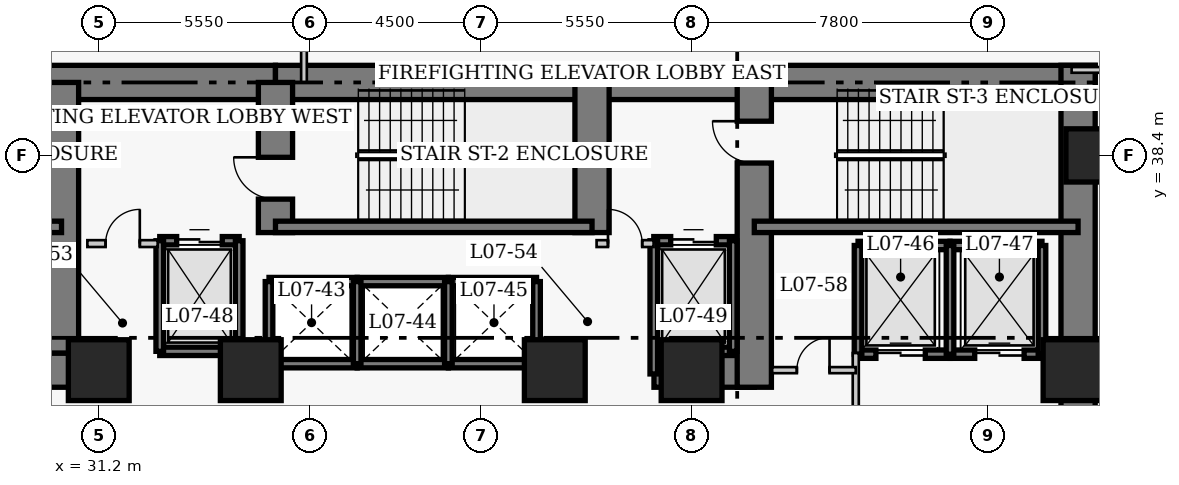
"""IFC4 building model, lengths in metres.
Left out: names, types, materials, properties, quantities, classifications, styles, units other than length and angle.
Written with IfcOpenShell. Run it as: python <this file> out.ifc"""

import sys

from ifc_helpers import new_model, si_unit, direction, frame, frame_2d, origin, origin_2d, place, context, subcontext, project, spatial, rectangle, extrude, element, fill, save


model = new_model("IFC4")
c1 = context("Model", 3, precision=1e-05, world=origin(), true_north=direction((0.0, 1.0)))
c2 = subcontext(c1, "Body", "Model", "MODEL_VIEW")
j1 = project(units=[si_unit("LENGTHUNIT", "METRE"), si_unit("PLANEANGLEUNIT", "RADIAN")], contexts=[c1])
p1 = place(None, origin())
s1 = spatial("IfcSite", under=j1, at=p1, CompositionType="ELEMENT")
p2 = place(p1, origin())
s2 = spatial("IfcBuilding", under=s1, at=p2, CompositionType="ELEMENT")
p3 = place(p2, frame((0.0, 0.0, 33.6)))
s3 = spatial("IfcBuildingStorey", under=s2, at=p3, CompositionType="ELEMENT", Elevation=33.6)
p4 = place(p3, frame((21.45, 40.32, 0.0), z_axis=(0.0, 0.0, 1.0), x_axis=(1.0, 0.0, 0.0)))
e1 = element("IfcWall", 1, at=p4, inside=s3, PredefinedType="SHEAR", context=c2, shape_type="SweptSolid", body=[
    extrude(rectangle(XDim=14.4, YDim=0.9, at=frame_2d((7.2, 0.0))), origin(), (0.0, 0.0, 1.0), 3.8),
])
p5 = place(p3, frame((35.85, 40.32, 0.0), z_axis=(0.0, 0.0, 1.0), x_axis=(1.0, 0.0, 0.0)))
e2 = element("IfcWall", 2, at=p5, inside=s3, PredefinedType="SHEAR", context=c2, shape_type="SweptSolid", body=[
    extrude(rectangle(XDim=12.6, YDim=0.9, at=frame_2d((6.3, 0.0))), origin(), (0.0, 0.0, 1.0), 3.8),
])
p6 = place(p3, frame((48.45, 40.32, 0.0), z_axis=(0.0, 0.0, 1.0), x_axis=(1.0, 0.0, 0.0)))
e3 = element("IfcWall", 3, at=p6, inside=s3, PredefinedType="SHEAR", context=c2, shape_type="SweptSolid", body=[
    extrude(rectangle(XDim=8.97, YDim=0.9, at=frame_2d((4.485, 0.0))), origin(), (0.0, 0.0, 1.0), 3.8),
])
p7 = place(p3, frame((56.97, 27.05, 0.0), z_axis=(0.0, 0.0, 1.0), x_axis=(0.0, 1.0, 0.0)))
e4 = element("IfcWall", 4, at=p7, inside=s3, PredefinedType="SHEAR", context=c2, shape_type="SweptSolid", body=[
    extrude(rectangle(XDim=13.72, YDim=0.9, at=frame_2d((6.86, 0.0))), origin(), (0.0, 0.0, 1.0), 3.8),
])
p8 = place(p3, frame((28.45, 32.75, 0.0), z_axis=(0.0, 0.0, 1.0), x_axis=(1.0, 0.0, 0.0)))
e5 = element("IfcWall", 5, at=p8, inside=s3, PredefinedType="SHEAR", context=c2, shape_type="SweptSolid", body=[
    extrude(rectangle(XDim=2.4, YDim=0.9, at=frame_2d((1.2, 0.0))), origin(), (0.0, 0.0, 1.0), 3.8),
])
p9 = place(p3, frame((45.81, 32.75, 0.0), z_axis=(0.0, 0.0, 1.0), x_axis=(1.0, 0.0, 0.0)))
e6 = element("IfcWall", 6, at=p9, inside=s3, PredefinedType="SHEAR", context=c2, shape_type="SweptSolid", body=[
    extrude(rectangle(XDim=2.64, YDim=0.9, at=frame_2d((1.32, 0.0))), origin(), (0.0, 0.0, 1.0), 3.8),
])
p10 = place(p3, frame((30.22, 33.2, 0.0), z_axis=(0.0, 0.0, 1.0), x_axis=(0.0, 1.0, 0.0)))
e7 = element("IfcWall", 7, at=p10, inside=s3, PredefinedType="SHEAR", context=c2, shape_type="SweptSolid", body=[
    extrude(rectangle(XDim=7.12, YDim=0.9, at=frame_2d((3.56, 0.0))), origin(), (0.0, 0.0, 1.0), 3.8),
])
p11 = place(p3, frame((35.85, 36.37, 0.0), z_axis=(0.0, 0.0, 1.0), x_axis=(0.0, 1.0, 0.0)))
e8 = element("IfcWall", 8, at=p11, inside=s3, PredefinedType="SHEAR", context=c2, shape_type="SweptSolid", body=[
    extrude(rectangle(XDim=3.95, YDim=0.9, at=frame_2d((1.975, 0.0))), origin(), (0.0, 0.0, 1.0), 3.8),
])
p12 = place(p11, frame((0.88, 0.0, 0.0)))
e9 = element("IfcOpeningElement", 9, at=p12, cuts=e8, PredefinedType="OPENING", context=c2, shape_type="SweptSolid", body=[
    extrude(rectangle(XDim=1.1, YDim=2.15, at=frame_2d((0.55, 1.075))), frame((0.0, 0.46, 0.0), z_axis=(0.0, -1.0, 0.0), x_axis=(1.0, 0.0, 0.0)), (0.0, 0.0, 1.0), 0.92),
])
p13 = place(p3, frame((44.18, 36.37, 0.0), z_axis=(0.0, 0.0, 1.0), x_axis=(0.0, 1.0, 0.0)))
e10 = element("IfcWall", 10, at=p13, inside=s3, PredefinedType="SHEAR", context=c2, shape_type="SweptSolid", body=[
    extrude(rectangle(XDim=3.95, YDim=0.9, at=frame_2d((1.975, 0.0))), origin(), (0.0, 0.0, 1.0), 3.8),
])
p14 = place(p3, frame((48.45, 32.3, 0.0), z_axis=(0.0, 0.0, 1.0), x_axis=(0.0, 1.0, 0.0)))
e11 = element("IfcWall", 11, at=p14, inside=s3, PredefinedType="SHEAR", context=c2, shape_type="SweptSolid", body=[
    extrude(rectangle(XDim=8.02, YDim=0.9, at=frame_2d((4.01, 0.0))), origin(), (0.0, 0.0, 1.0), 3.8),
])
p15 = place(p14, frame((5.9, 0.0, 0.0)))
e12 = element("IfcOpeningElement", 12, at=p15, cuts=e11, PredefinedType="OPENING", context=c2, shape_type="SweptSolid", body=[
    extrude(rectangle(XDim=1.1, YDim=2.15, at=frame_2d((0.55, 1.075))), frame((0.0, 0.46, 0.0), z_axis=(0.0, -1.0, 0.0), x_axis=(1.0, 0.0, 0.0)), (0.0, 0.0, 1.0), 0.92),
])
p16 = place(p3, frame((21.9, 36.52, 0.0), z_axis=(0.0, 0.0, 1.0), x_axis=(1.0, 0.0, 0.0)))
e13 = element("IfcWall", 13, at=p16, inside=s3, PredefinedType="SHEAR", context=c2, shape_type="SweptSolid", body=[
    extrude(rectangle(XDim=8.32, YDim=0.3, at=frame_2d((4.16, 0.0))), origin(), (0.0, 0.0, 1.0), 3.8),
])
p17 = place(p16, frame((0.9, 0.0, 0.0)))
e14 = element("IfcOpeningElement", 14, at=p17, cuts=e13, PredefinedType="OPENING", context=c2, shape_type="SweptSolid", body=[
    extrude(rectangle(XDim=1.1, YDim=2.15, at=frame_2d((0.55, 1.075))), frame((0.0, 0.16, 0.0), z_axis=(0.0, -1.0, 0.0), x_axis=(1.0, 0.0, 0.0)), (0.0, 0.0, 1.0), 0.32),
])
p18 = place(p3, frame((35.85, 36.52, 0.0), z_axis=(0.0, 0.0, 1.0), x_axis=(1.0, 0.0, 0.0)))
e15 = element("IfcWall", 15, at=p18, inside=s3, PredefinedType="SHEAR", context=c2, shape_type="SweptSolid", body=[
    extrude(rectangle(XDim=8.33, YDim=0.3, at=frame_2d((4.165, 0.0))), origin(), (0.0, 0.0, 1.0), 3.8),
])
p19 = place(p3, frame((48.45, 36.52, 0.0), z_axis=(0.0, 0.0, 1.0), x_axis=(1.0, 0.0, 0.0)))
e16 = element("IfcWall", 16, at=p19, inside=s3, PredefinedType="SHEAR", context=c2, shape_type="SweptSolid", body=[
    extrude(rectangle(XDim=8.52, YDim=0.3, at=frame_2d((4.26, 0.0))), origin(), (0.0, 0.0, 1.0), 3.8),
])
p20 = place(p3, frame((57.35, 38.4, 0.0), z_axis=(0.0, 0.0, 1.0), x_axis=(1.0, 0.0, 0.0)))
e17 = element("IfcColumn", 17, at=p20, inside=s3, PredefinedType="COLUMN", context=c2, shape_type="SweptSolid", body=[
    extrude(rectangle(XDim=1.4, YDim=1.4, at=origin_2d()), origin(), (0.0, 0.0, 1.0), 3.8),
])
for number, where, z_axis, x_axis in (
    (18, (31.2, 32.75, 0.0), (0.0, 0.0, 1.0), (1.0, 0.0, 0.0)),
    (19, (35.2, 32.75, 0.0), (0.0, 0.0, 1.0), (1.0, 0.0, 0.0)),
    (20, (43.2, 32.75, 0.0), (0.0, 0.0, 1.0), (1.0, 0.0, 0.0)),
    (21, (46.8, 32.75, 0.0), (0.0, 0.0, 1.0), (1.0, 0.0, 0.0)),
    (22, (56.85, 32.75, 0.0), (0.0, 0.0, 1.0), (1.0, 0.0, 0.0)),
):
    element("IfcColumn", number, at=place(p3, frame(where, z_axis=z_axis, x_axis=x_axis)), inside=s3, PredefinedType="COLUMN", context=c2, shape_type="SweptSolid", body=[
        extrude(rectangle(XDim=1.6, YDim=1.6, at=origin_2d()), origin(), (0.0, 0.0, 1.0), 3.8),
    ])
for number, where, z_axis, x_axis in (
    (23, (35.68, 35.08, 0.0), (0.0, 0.0, 1.0), (1.0, 0.0, 0.0)),
    (24, (35.68, 32.92, 0.0), (0.0, 0.0, 1.0), (1.0, 0.0, 0.0)),
):
    element("IfcWall", number, at=place(p3, frame(where, z_axis=z_axis, x_axis=x_axis)), inside=s3, PredefinedType="SHEAR", context=c2, shape_type="SweptSolid", body=[
        extrude(rectangle(XDim=2.32, YDim=0.22, at=frame_2d((1.16, 0.0))), origin(), (0.0, 0.0, 1.0), 3.8),
    ])
p21 = place(p3, frame((35.68, 32.92, 0.0), z_axis=(0.0, 0.0, 1.0), x_axis=(0.0, 1.0, 0.0)))
e25 = element("IfcWall", 25, at=p21, inside=s3, PredefinedType="SHEAR", context=c2, shape_type="SweptSolid", body=[
    extrude(rectangle(XDim=2.16, YDim=0.2, at=frame_2d((1.08, 0.0))), origin(), (0.0, 0.0, 1.0), 3.8),
])
for number, where, z_axis, x_axis in (
    (26, (38.0, 35.08, 0.0), (0.0, 0.0, 1.0), (1.0, 0.0, 0.0)),
    (27, (38.0, 32.92, 0.0), (0.0, 0.0, 1.0), (1.0, 0.0, 0.0)),
):
    element("IfcWall", number, at=place(p3, frame(where, z_axis=z_axis, x_axis=x_axis)), inside=s3, PredefinedType="SHEAR", context=c2, shape_type="SweptSolid", body=[
        extrude(rectangle(XDim=2.4, YDim=0.22, at=frame_2d((1.2, 0.0))), origin(), (0.0, 0.0, 1.0), 3.8),
    ])
p22 = place(p3, frame((38.0, 32.92, 0.0), z_axis=(0.0, 0.0, 1.0), x_axis=(0.0, 1.0, 0.0)))
e28 = element("IfcWall", 28, at=p22, inside=s3, PredefinedType="SHEAR", context=c2, shape_type="SweptSolid", body=[
    extrude(rectangle(XDim=2.16, YDim=0.2, at=frame_2d((1.08, 0.0))), origin(), (0.0, 0.0, 1.0), 3.8),
])
for number, where, z_axis, x_axis in (
    (29, (40.4, 35.08, 0.0), (0.0, 0.0, 1.0), (1.0, 0.0, 0.0)),
    (30, (40.4, 32.92, 0.0), (0.0, 0.0, 1.0), (1.0, 0.0, 0.0)),
):
    element("IfcWall", number, at=place(p3, frame(where, z_axis=z_axis, x_axis=x_axis)), inside=s3, PredefinedType="SHEAR", context=c2, shape_type="SweptSolid", body=[
        extrude(rectangle(XDim=2.32, YDim=0.22, at=frame_2d((1.16, 0.0))), origin(), (0.0, 0.0, 1.0), 3.8),
    ])
for number, where, z_axis, x_axis in (
    (31, (40.4, 32.92, 0.0), (0.0, 0.0, 1.0), (0.0, 1.0, 0.0)),
    (32, (42.72, 32.92, 0.0), (0.0, 0.0, 1.0), (0.0, 1.0, 0.0)),
):
    element("IfcWall", number, at=place(p3, frame(where, z_axis=z_axis, x_axis=x_axis)), inside=s3, PredefinedType="SHEAR", context=c2, shape_type="SweptSolid", body=[
        extrude(rectangle(XDim=2.16, YDim=0.2, at=frame_2d((1.08, 0.0))), origin(), (0.0, 0.0, 1.0), 3.8),
    ])
p23 = place(p3, frame((51.18, 36.03, 0.0), z_axis=(0.0, 0.0, 1.0), x_axis=(1.0, 0.0, 0.0)))
e33 = element("IfcWall", 33, at=p23, inside=s3, PredefinedType="SHEAR", context=c2, shape_type="SweptSolid", body=[
    extrude(rectangle(XDim=2.42, YDim=0.22, at=frame_2d((1.21, 0.0))), origin(), (0.0, 0.0, 1.0), 3.8),
])
p24 = place(p3, frame((51.18, 33.17, 0.0), z_axis=(0.0, 0.0, 1.0), x_axis=(1.0, 0.0, 0.0)))
e34 = element("IfcWall", 34, at=p24, inside=s3, PredefinedType="SHEAR", context=c2, shape_type="SweptSolid", body=[
    extrude(rectangle(XDim=2.42, YDim=0.22, at=frame_2d((1.21, 0.0))), origin(), (0.0, 0.0, 1.0), 3.8),
])
p25 = place(p24, frame((0.47, 0.0, 0.0)))
e35 = element("IfcOpeningElement", 35, at=p25, cuts=e34, PredefinedType="OPENING", context=c2, shape_type="SweptSolid", body=[
    extrude(rectangle(XDim=1.3, YDim=2.15, at=frame_2d((0.65, 1.075))), frame((0.0, 0.12, 0.0), z_axis=(0.0, -1.0, 0.0), x_axis=(1.0, 0.0, 0.0)), (0.0, 0.0, 1.0), 0.24),
])
p26 = place(p3, frame((51.18, 33.17, 0.0), z_axis=(0.0, 0.0, 1.0), x_axis=(0.0, 1.0, 0.0)))
e36 = element("IfcWall", 36, at=p26, inside=s3, PredefinedType="SHEAR", context=c2, shape_type="SweptSolid", body=[
    extrude(rectangle(XDim=2.86, YDim=0.2, at=frame_2d((1.43, 0.0))), origin(), (0.0, 0.0, 1.0), 3.8),
])
p27 = place(p3, frame((53.6, 36.03, 0.0), z_axis=(0.0, 0.0, 1.0), x_axis=(1.0, 0.0, 0.0)))
e37 = element("IfcWall", 37, at=p27, inside=s3, PredefinedType="SHEAR", context=c2, shape_type="SweptSolid", body=[
    extrude(rectangle(XDim=2.42, YDim=0.22, at=frame_2d((1.21, 0.0))), origin(), (0.0, 0.0, 1.0), 3.8),
])
p28 = place(p3, frame((53.6, 33.17, 0.0), z_axis=(0.0, 0.0, 1.0), x_axis=(1.0, 0.0, 0.0)))
e38 = element("IfcWall", 38, at=p28, inside=s3, PredefinedType="SHEAR", context=c2, shape_type="SweptSolid", body=[
    extrude(rectangle(XDim=2.42, YDim=0.22, at=frame_2d((1.21, 0.0))), origin(), (0.0, 0.0, 1.0), 3.8),
])
p29 = place(p28, frame((0.65, 0.0, 0.0)))
e39 = element("IfcOpeningElement", 39, at=p29, cuts=e38, PredefinedType="OPENING", context=c2, shape_type="SweptSolid", body=[
    extrude(rectangle(XDim=1.3, YDim=2.15, at=frame_2d((0.65, 1.075))), frame((0.0, 0.12, 0.0), z_axis=(0.0, -1.0, 0.0), x_axis=(1.0, 0.0, 0.0)), (0.0, 0.0, 1.0), 0.24),
])
for number, where, z_axis, x_axis in (
    (40, (53.6, 33.17, 0.0), (0.0, 0.0, 1.0), (0.0, 1.0, 0.0)),
    (41, (56.02, 33.17, 0.0), (0.0, 0.0, 1.0), (0.0, 1.0, 0.0)),
):
    element("IfcWall", number, at=place(p3, frame(where, z_axis=z_axis, x_axis=x_axis)), inside=s3, PredefinedType="SHEAR", context=c2, shape_type="SweptSolid", body=[
        extrude(rectangle(XDim=2.86, YDim=0.2, at=frame_2d((1.43, 0.0))), origin(), (0.0, 0.0, 1.0), 3.8),
    ])
p30 = place(p3, frame((32.805, 36.155, 0.0), z_axis=(0.0, 0.0, 1.0), x_axis=(1.0, 0.0, 0.0)))
e42 = element("IfcWall", 42, at=p30, inside=s3, PredefinedType="SHEAR", context=c2, shape_type="SweptSolid", body=[
    extrude(rectangle(XDim=2.09, YDim=0.22, at=frame_2d((1.045, 0.0))), origin(), (0.0, 0.0, 1.0), 3.8),
])
p31 = place(p30, frame((0.445, 0.0, 0.0)))
e43 = element("IfcOpeningElement", 43, at=p31, cuts=e42, PredefinedType="OPENING", context=c2, shape_type="SweptSolid", body=[
    extrude(rectangle(XDim=1.2, YDim=2.15, at=frame_2d((0.6, 1.075))), frame((0.0, 0.12, 0.0), z_axis=(0.0, -1.0, 0.0), x_axis=(1.0, 0.0, 0.0)), (0.0, 0.0, 1.0), 0.24),
])
p32 = place(p3, frame((32.805, 33.245, 0.0), z_axis=(0.0, 0.0, 1.0), x_axis=(1.0, 0.0, 0.0)))
e44 = element("IfcWall", 44, at=p32, inside=s3, PredefinedType="SHEAR", context=c2, shape_type="SweptSolid", body=[
    extrude(rectangle(XDim=2.09, YDim=0.22, at=frame_2d((1.045, 0.0))), origin(), (0.0, 0.0, 1.0), 3.8),
])
for number, where, z_axis, x_axis in (
    (45, (32.805, 33.245, 0.0), (0.0, 0.0, 1.0), (0.0, 1.0, 0.0)),
    (46, (34.895, 33.245, 0.0), (0.0, 0.0, 1.0), (0.0, 1.0, 0.0)),
):
    element("IfcWall", number, at=place(p3, frame(where, z_axis=z_axis, x_axis=x_axis)), inside=s3, PredefinedType="SHEAR", context=c2, shape_type="SweptSolid", body=[
        extrude(rectangle(XDim=2.91, YDim=0.2, at=frame_2d((1.455, 0.0))), origin(), (0.0, 0.0, 1.0), 3.8),
    ])
p33 = place(p3, frame((45.805, 36.155, 0.0), z_axis=(0.0, 0.0, 1.0), x_axis=(1.0, 0.0, 0.0)))
e47 = element("IfcWall", 47, at=p33, inside=s3, PredefinedType="SHEAR", context=c2, shape_type="SweptSolid", body=[
    extrude(rectangle(XDim=2.09, YDim=0.22, at=frame_2d((1.045, 0.0))), origin(), (0.0, 0.0, 1.0), 3.8),
])
p34 = place(p33, frame((0.445, 0.0, 0.0)))
e48 = element("IfcOpeningElement", 48, at=p34, cuts=e47, PredefinedType="OPENING", context=c2, shape_type="SweptSolid", body=[
    extrude(rectangle(XDim=1.2, YDim=2.15, at=frame_2d((0.6, 1.075))), frame((0.0, 0.12, 0.0), z_axis=(0.0, -1.0, 0.0), x_axis=(1.0, 0.0, 0.0)), (0.0, 0.0, 1.0), 0.24),
])
p35 = place(p3, frame((45.805, 33.245, 0.0), z_axis=(0.0, 0.0, 1.0), x_axis=(1.0, 0.0, 0.0)))
e49 = element("IfcWall", 49, at=p35, inside=s3, PredefinedType="SHEAR", context=c2, shape_type="SweptSolid", body=[
    extrude(rectangle(XDim=2.09, YDim=0.22, at=frame_2d((1.045, 0.0))), origin(), (0.0, 0.0, 1.0), 3.8),
])
p36 = place(p3, frame((45.805, 32.65, 0.0), z_axis=(0.0, 0.0, 1.0), x_axis=(0.0, 1.0, 0.0)))
e50 = element("IfcWall", 50, at=p36, inside=s3, PredefinedType="SHEAR", context=c2, shape_type="SweptSolid", body=[
    extrude(rectangle(XDim=3.505, YDim=0.2, at=frame_2d((1.752, 0.0))), origin(), (0.0, 0.0, 1.0), 3.8),
])
p37 = place(p3, frame((47.895, 33.245, 0.0), z_axis=(0.0, 0.0, 1.0), x_axis=(0.0, 1.0, 0.0)))
e51 = element("IfcWall", 51, at=p37, inside=s3, PredefinedType="SHEAR", context=c2, shape_type="SweptSolid", body=[
    extrude(rectangle(XDim=2.91, YDim=0.2, at=frame_2d((1.455, 0.0))), origin(), (0.0, 0.0, 1.0), 3.8),
])
p38 = place(p3, frame((30.9, 36.08, 0.0), z_axis=(0.0, 0.0, 1.0), x_axis=(1.0, 0.0, 0.0)))
e52 = element("IfcWall", 52, at=p38, inside=s3, PredefinedType="PARTITIONING", context=c2, shape_type="SweptSolid", body=[
    extrude(rectangle(XDim=1.85, YDim=0.18, at=frame_2d((0.925, 0.0))), origin(), (0.0, 0.0, 1.0), 3.54),
])
p39 = place(p38, frame((0.48, 0.0, 0.0)))
e53 = element("IfcOpeningElement", 53, at=p39, cuts=e52, PredefinedType="OPENING", context=c2, shape_type="SweptSolid", body=[
    extrude(rectangle(XDim=0.9, YDim=2.15, at=frame_2d((0.45, 1.075))), frame((0.0, 0.1, 0.0), z_axis=(0.0, -1.0, 0.0), x_axis=(1.0, 0.0, 0.0)), (0.0, 0.0, 1.0), 0.2),
])
p40 = place(p3, frame((44.3, 36.08, 0.0), z_axis=(0.0, 0.0, 1.0), x_axis=(1.0, 0.0, 0.0)))
e54 = element("IfcWall", 54, at=p40, inside=s3, PredefinedType="PARTITIONING", context=c2, shape_type="SweptSolid", body=[
    extrude(rectangle(XDim=1.5, YDim=0.18, at=frame_2d((0.75, 0.0))), origin(), (0.0, 0.0, 1.0), 3.54),
])
p41 = place(p40, frame((0.3, 0.0, 0.0)))
e55 = element("IfcOpeningElement", 55, at=p41, cuts=e54, PredefinedType="OPENING", context=c2, shape_type="SweptSolid", body=[
    extrude(rectangle(XDim=0.9, YDim=2.15, at=frame_2d((0.45, 1.075))), frame((0.0, 0.1, 0.0), z_axis=(0.0, -1.0, 0.0), x_axis=(1.0, 0.0, 0.0)), (0.0, 0.0, 1.0), 0.2),
])
p42 = place(p3, frame((51.12, 29.5, 0.0), z_axis=(0.0, 0.0, 1.0), x_axis=(0.0, 1.0, 0.0)))
e56 = element("IfcWall", 56, at=p42, inside=s3, PredefinedType="PARTITIONING", context=c2, shape_type="SweptSolid", body=[
    extrude(rectangle(XDim=3.7, YDim=0.16, at=frame_2d((1.85, 0.0))), origin(), (0.0, 0.0, 1.0), 3.54),
])
p43 = place(p42, frame((0.9, 0.0, 0.0)))
e57 = element("IfcOpeningElement", 57, at=p43, cuts=e56, PredefinedType="OPENING", context=c2, shape_type="SweptSolid", body=[
    extrude(rectangle(XDim=1.1, YDim=2.15, at=frame_2d((0.55, 1.075))), frame((0.0, 0.09, 0.0), z_axis=(0.0, -1.0, 0.0), x_axis=(1.0, 0.0, 0.0)), (0.0, 0.0, 1.0), 0.18),
])
p44 = place(p3, frame((48.92, 32.75, 0.0), z_axis=(0.0, 0.0, 1.0), x_axis=(1.0, 0.0, 0.0)))
e58 = element("IfcWall", 58, at=p44, inside=s3, PredefinedType="PARTITIONING", context=c2, shape_type="SweptSolid", body=[
    extrude(rectangle(XDim=2.2, YDim=0.16, at=frame_2d((1.1, 0.0))), origin(), (0.0, 0.0, 1.0), 3.54),
])
p45 = place(p44, frame((0.65, 0.0, 0.0)))
e59 = element("IfcOpeningElement", 59, at=p45, cuts=e58, PredefinedType="OPENING", context=c2, shape_type="SweptSolid", body=[
    extrude(rectangle(XDim=0.86, YDim=2.05, at=frame_2d((0.43, 1.025))), frame((0.0, 0.09, 0.0), z_axis=(0.0, -1.0, 0.0), x_axis=(1.0, 0.0, 0.0)), (0.0, 0.0, 1.0), 0.18),
])
p46 = place(p3, frame((56.8, 40.65, 0.0), z_axis=(0.0, 0.0, 1.0), x_axis=(1.0, 0.0, 0.0)))
e60 = element("IfcWall", 60, at=p46, inside=s3, PredefinedType="PARTITIONING", context=c2, shape_type="SweptSolid", body=[
    extrude(rectangle(XDim=3.66, YDim=0.15, at=frame_2d((1.83, 0.0))), origin(), (0.0, 0.0, 1.0), 3.54),
])
p47 = place(p46, frame((2.05, 0.0, 0.0)))
e61 = element("IfcOpeningElement", 61, at=p47, cuts=e60, PredefinedType="OPENING", context=c2, shape_type="SweptSolid", body=[
    extrude(rectangle(XDim=1.0, YDim=2.15, at=frame_2d((0.5, 1.075))), frame((0.0, 0.085, 0.0), z_axis=(0.0, -1.0, 0.0), x_axis=(1.0, 0.0, 0.0)), (0.0, 0.0, 1.0), 0.17),
])
p48 = place(p3, frame((36.6, 40.32, 0.0), z_axis=(0.0, 0.0, 1.0), x_axis=(0.0, 1.0, 0.0)))
e62 = element("IfcWall", 62, at=p48, inside=s3, PredefinedType="PARTITIONING", context=c2, shape_type="SweptSolid", body=[
    extrude(rectangle(XDim=5.045, YDim=0.15, at=frame_2d((2.522, 0.0))), origin(), (0.0, 0.0, 1.0), 3.54),
])
p49 = place(p25, origin())
e63 = element("IfcDoor", 63, at=p49, inside=s3, OperationType="DOUBLE_DOOR_SLIDING", PredefinedType="DOOR", context=c2, shape_type="SweptSolid", body=[
    extrude(rectangle(XDim=1.3, YDim=2.15, at=frame_2d((0.65, 1.075))), frame((0.0, 0.025, 0.0), z_axis=(0.0, -1.0, 0.0), x_axis=(1.0, 0.0, 0.0)), (0.0, 0.0, 1.0), 0.05),
])
fill(e35, e63)
p50 = place(p29, origin())
e64 = element("IfcDoor", 64, at=p50, inside=s3, OperationType="DOUBLE_DOOR_SLIDING", PredefinedType="DOOR", context=c2, shape_type="SweptSolid", body=[
    extrude(rectangle(XDim=1.3, YDim=2.15, at=frame_2d((0.65, 1.075))), frame((0.0, 0.025, 0.0), z_axis=(0.0, -1.0, 0.0), x_axis=(1.0, 0.0, 0.0)), (0.0, 0.0, 1.0), 0.05),
])
fill(e39, e64)
p51 = place(p31, origin())
e65 = element("IfcDoor", 65, at=p51, inside=s3, OperationType="DOUBLE_DOOR_SLIDING", PredefinedType="DOOR", context=c2, shape_type="SweptSolid", body=[
    extrude(rectangle(XDim=1.2, YDim=2.15, at=frame_2d((0.6, 1.075))), frame((0.0, 0.025, 0.0), z_axis=(0.0, -1.0, 0.0), x_axis=(1.0, 0.0, 0.0)), (0.0, 0.0, 1.0), 0.05),
])
fill(e43, e65)
p52 = place(p34, origin())
e66 = element("IfcDoor", 66, at=p52, inside=s3, OperationType="DOUBLE_DOOR_SLIDING", PredefinedType="DOOR", context=c2, shape_type="SweptSolid", body=[
    extrude(rectangle(XDim=1.2, YDim=2.15, at=frame_2d((0.6, 1.075))), frame((0.0, 0.025, 0.0), z_axis=(0.0, -1.0, 0.0), x_axis=(1.0, 0.0, 0.0)), (0.0, 0.0, 1.0), 0.05),
])
fill(e48, e66)
p53 = place(p39, origin())
e67 = element("IfcDoor", 67, at=p53, inside=s3, OperationType="SINGLE_SWING_RIGHT", PredefinedType="DOOR", context=c2, shape_type="SweptSolid", body=[
    extrude(rectangle(XDim=0.9, YDim=2.15, at=frame_2d((0.45, 1.075))), frame((0.0, 0.025, 0.0), z_axis=(0.0, -1.0, 0.0), x_axis=(1.0, 0.0, 0.0)), (0.0, 0.0, 1.0), 0.05),
])
fill(e53, e67)
p54 = place(p41, origin())
e68 = element("IfcDoor", 68, at=p54, inside=s3, OperationType="SINGLE_SWING_LEFT", PredefinedType="DOOR", context=c2, shape_type="SweptSolid", body=[
    extrude(rectangle(XDim=0.9, YDim=2.15, at=frame_2d((0.45, 1.075))), frame((0.0, 0.025, 0.0), z_axis=(0.0, -1.0, 0.0), x_axis=(1.0, 0.0, 0.0)), (0.0, 0.0, 1.0), 0.05),
])
fill(e55, e68)
p55 = place(p45, origin())
e69 = element("IfcDoor", 69, at=p55, inside=s3, OperationType="SINGLE_SWING_RIGHT", PredefinedType="DOOR", context=c2, shape_type="SweptSolid", body=[
    extrude(rectangle(XDim=0.86, YDim=2.05, at=frame_2d((0.43, 1.025))), frame((0.0, 0.025, 0.0), z_axis=(0.0, -1.0, 0.0), x_axis=(1.0, 0.0, 0.0)), (0.0, 0.0, 1.0), 0.05),
])
fill(e59, e69)
p56 = place(p12, origin())
e70 = element("IfcDoor", 70, at=p56, inside=s3, OperationType="SINGLE_SWING_RIGHT", PredefinedType="DOOR", context=c2, shape_type="SweptSolid", body=[
    extrude(rectangle(XDim=1.1, YDim=2.15, at=frame_2d((0.55, 1.075))), frame((0.0, 0.025, 0.0), z_axis=(0.0, -1.0, 0.0), x_axis=(1.0, 0.0, 0.0)), (0.0, 0.0, 1.0), 0.05),
])
fill(e9, e70)
p57 = place(p15, origin())
e71 = element("IfcDoor", 71, at=p57, inside=s3, OperationType="SINGLE_SWING_RIGHT", PredefinedType="DOOR", context=c2, shape_type="SweptSolid", body=[
    extrude(rectangle(XDim=1.1, YDim=2.15, at=frame_2d((0.55, 1.075))), frame((0.0, 0.025, 0.0), z_axis=(0.0, -1.0, 0.0), x_axis=(1.0, 0.0, 0.0)), (0.0, 0.0, 1.0), 0.05),
])
fill(e12, e71)
save(model, sys.argv[1])
